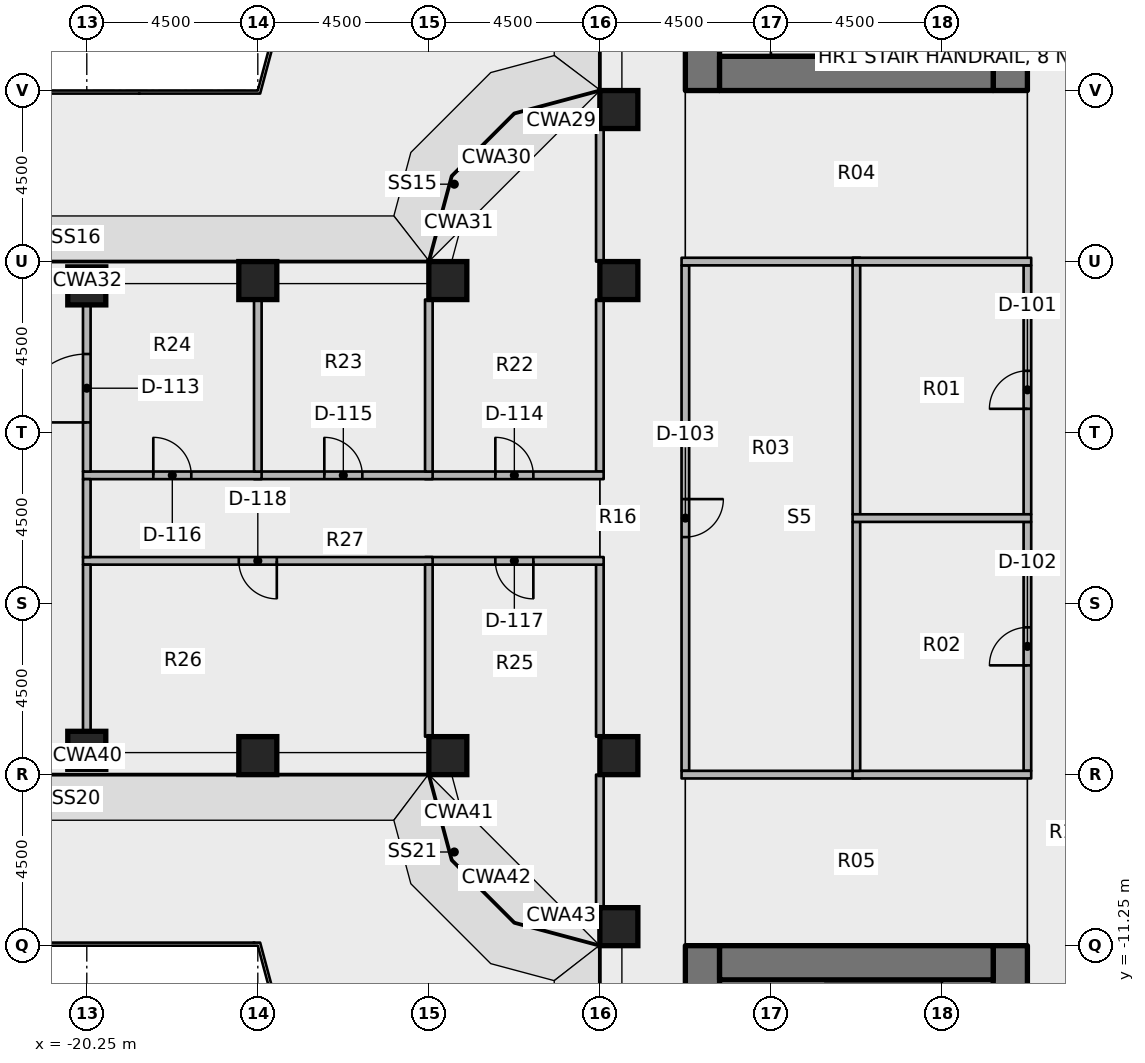
"""IFC4 building model, lengths in metres.
Left out: names, types, materials, properties, quantities, classifications, styles, units other than length and angle.
Written with IfcOpenShell. Run it as: python <this file> out.ifc"""

import sys

from ifc_helpers import new_model, si_unit, direction, frame, frame_2d, origin, origin_2d, place, context, subcontext, project, spatial, rectangle, extrude, element, fill, save


model = new_model("IFC4")
c1 = context("Model", 3, precision=1e-05, world=origin(), true_north=direction((0.0, 1.0)))
c2 = subcontext(c1, "Body", "Model", "MODEL_VIEW")
j1 = project(units=[si_unit("LENGTHUNIT", "METRE"), si_unit("PLANEANGLEUNIT", "RADIAN")], contexts=[c1])
p1 = place(None, origin())
s1 = spatial("IfcSite", under=j1, at=p1, CompositionType="ELEMENT")
p2 = place(p1, origin())
s2 = spatial("IfcBuilding", under=s1, at=p2, CompositionType="ELEMENT")
p3 = place(p2, frame((0.0, 0.0, 27.0)))
s3 = spatial("IfcBuildingStorey", under=s2, at=p3, CompositionType="ELEMENT", Elevation=27.0)
for number, where, z_axis, x_axis in (
    (1, (-20.25, -6.11, 0.0), (0.0, 0.0, 1.0), (1.0, 0.0, 0.0)),
    (2, (-20.25, 6.11, 0.0), (0.0, 0.0, 1.0), (1.0, 0.0, 0.0)),
    (3, (-15.75, -6.25, 0.0), (0.0, 0.0, 1.0), (1.0, 0.0, 0.0)),
    (4, (-15.75, 6.25, 0.0), (0.0, 0.0, 1.0), (1.0, 0.0, 0.0)),
    (5, (-10.75, -6.25, 0.0), (0.0, 0.0, 1.0), (1.0, 0.0, 0.0)),
    (6, (-10.75, 6.25, 0.0), (0.0, 0.0, 1.0), (1.0, 0.0, 0.0)),
    (7, (-6.25, -10.75, 0.0), (0.0, 0.0, 1.0), (1.0, 0.0, 0.0)),
    (8, (-6.25, -6.25, 0.0), (0.0, 0.0, 1.0), (1.0, 0.0, 0.0)),
    (9, (-6.25, 6.25, 0.0), (0.0, 0.0, 1.0), (1.0, 0.0, 0.0)),
    (10, (-6.25, 10.75, 0.0), (0.0, 0.0, 1.0), (1.0, 0.0, 0.0)),
):
    element("IfcColumn", number, at=place(p3, frame(where, z_axis=z_axis, x_axis=x_axis)), inside=s3, PredefinedType="COLUMN", context=c2, shape_type="SweptSolid", body=[
        extrude(rectangle(XDim=1.0, YDim=1.0, at=origin_2d()), origin(), (0.0, 0.0, 1.0), 4.05),
    ])
p4 = place(p3, frame((-4.05, 11.25, 0.0), z_axis=(0.0, 0.0, 1.0), x_axis=(0.0, 1.0, 0.0)))
e11 = element("IfcWall", 11, at=p4, inside=s3, PredefinedType="SHEAR", context=c2, shape_type="SweptSolid", body=[
    extrude(rectangle(XDim=15.0, YDim=0.9, at=frame_2d((7.5, 0.0))), origin(), (0.0, 0.0, 1.0), 4.2),
])
p5 = place(p4, frame((7.15, 0.0, 0.0)))
e12 = element("IfcOpeningElement", 12, at=p5, cuts=e11, PredefinedType="OPENING", context=c2, shape_type="SweptSolid", body=[
    extrude(rectangle(XDim=1.5, YDim=2.3, at=frame_2d((0.75, 1.15))), frame((0.0, 0.46, 0.0), z_axis=(0.0, -1.0, 0.0), x_axis=(1.0, 0.0, 0.0)), (0.0, 0.0, 1.0), 0.92),
])
p6 = place(p4, frame((13.9, 0.0, 0.0)))
e13 = element("IfcOpeningElement", 13, at=p6, cuts=e11, PredefinedType="OPENING", context=c2, shape_type="SweptSolid", body=[
    extrude(rectangle(XDim=0.9, YDim=2.1, at=frame_2d((0.45, 1.05))), frame((0.0, 0.46, 0.0), z_axis=(0.0, -1.0, 0.0), x_axis=(1.0, 0.0, 0.0)), (0.0, 0.0, 1.0), 0.92),
])
p7 = place(p4, frame((1.15, 0.0, 0.0)))
e14 = element("IfcOpeningElement", 14, at=p7, cuts=e11, PredefinedType="OPENING", context=c2, shape_type="SweptSolid", body=[
    extrude(rectangle(XDim=1.2, YDim=2.1, at=frame_2d((0.6, 1.05))), frame((0.0, 0.46, 0.0), z_axis=(0.0, -1.0, 0.0), x_axis=(1.0, 0.0, 0.0)), (0.0, 0.0, 1.0), 0.92),
])
p8 = place(p3, frame((4.05, 11.25, 0.0), z_axis=(0.0, 0.0, 1.0), x_axis=(0.0, 1.0, 0.0)))
e15 = element("IfcWall", 15, at=p8, inside=s3, PredefinedType="SHEAR", context=c2, shape_type="SweptSolid", body=[
    extrude(rectangle(XDim=15.0, YDim=0.9, at=frame_2d((7.5, 0.0))), origin(), (0.0, 0.0, 1.0), 4.2),
])
p9 = place(p8, frame((7.15, 0.0, 0.0)))
e16 = element("IfcOpeningElement", 16, at=p9, cuts=e15, PredefinedType="OPENING", context=c2, shape_type="SweptSolid", body=[
    extrude(rectangle(XDim=1.5, YDim=2.3, at=frame_2d((0.75, 1.15))), frame((0.0, 0.46, 0.0), z_axis=(0.0, -1.0, 0.0), x_axis=(1.0, 0.0, 0.0)), (0.0, 0.0, 1.0), 0.92),
])
p10 = place(p8, frame((5.55, 0.0, 0.0)))
e17 = element("IfcOpeningElement", 17, at=p10, cuts=e15, PredefinedType="OPENING", context=c2, shape_type="SweptSolid", body=[
    extrude(rectangle(XDim=1.2, YDim=2.1, at=frame_2d((0.6, 1.05))), frame((0.0, 0.46, 0.0), z_axis=(0.0, -1.0, 0.0), x_axis=(1.0, 0.0, 0.0)), (0.0, 0.0, 1.0), 0.92),
])
p11 = place(p3, frame((-3.6, 11.7, 0.0), z_axis=(0.0, 0.0, 1.0), x_axis=(1.0, 0.0, 0.0)))
e18 = element("IfcWall", 18, at=p11, inside=s3, PredefinedType="SHEAR", context=c2, shape_type="SweptSolid", body=[
    extrude(rectangle(XDim=7.2, YDim=0.9, at=frame_2d((3.6, 0.0))), origin(), (0.0, 0.0, 1.0), 4.2),
])
p12 = place(p3, frame((-4.05, -11.25, 0.0), z_axis=(0.0, 0.0, 1.0), x_axis=(0.0, -1.0, 0.0)))
e19 = element("IfcWall", 19, at=p12, inside=s3, PredefinedType="SHEAR", context=c2, shape_type="SweptSolid", body=[
    extrude(rectangle(XDim=15.0, YDim=0.9, at=frame_2d((7.5, 0.0))), origin(), (0.0, 0.0, 1.0), 4.2),
])
p13 = place(p12, frame((7.15, 0.0, 0.0)))
e20 = element("IfcOpeningElement", 20, at=p13, cuts=e19, PredefinedType="OPENING", context=c2, shape_type="SweptSolid", body=[
    extrude(rectangle(XDim=1.5, YDim=2.3, at=frame_2d((0.75, 1.15))), frame((0.0, 0.46, 0.0), z_axis=(0.0, -1.0, 0.0), x_axis=(1.0, 0.0, 0.0)), (0.0, 0.0, 1.0), 0.92),
])
p14 = place(p12, frame((5.55, 0.0, 0.0)))
e21 = element("IfcOpeningElement", 21, at=p14, cuts=e19, PredefinedType="OPENING", context=c2, shape_type="SweptSolid", body=[
    extrude(rectangle(XDim=1.2, YDim=2.1, at=frame_2d((0.6, 1.05))), frame((0.0, 0.46, 0.0), z_axis=(0.0, -1.0, 0.0), x_axis=(1.0, 0.0, 0.0)), (0.0, 0.0, 1.0), 0.92),
])
p15 = place(p3, frame((4.05, -11.25, 0.0), z_axis=(0.0, 0.0, 1.0), x_axis=(0.0, -1.0, 0.0)))
e22 = element("IfcWall", 22, at=p15, inside=s3, PredefinedType="SHEAR", context=c2, shape_type="SweptSolid", body=[
    extrude(rectangle(XDim=15.0, YDim=0.9, at=frame_2d((7.5, 0.0))), origin(), (0.0, 0.0, 1.0), 4.2),
])
p16 = place(p15, frame((7.15, 0.0, 0.0)))
e23 = element("IfcOpeningElement", 23, at=p16, cuts=e22, PredefinedType="OPENING", context=c2, shape_type="SweptSolid", body=[
    extrude(rectangle(XDim=1.5, YDim=2.3, at=frame_2d((0.75, 1.15))), frame((0.0, 0.46, 0.0), z_axis=(0.0, -1.0, 0.0), x_axis=(1.0, 0.0, 0.0)), (0.0, 0.0, 1.0), 0.92),
])
p17 = place(p15, frame((13.9, 0.0, 0.0)))
e24 = element("IfcOpeningElement", 24, at=p17, cuts=e22, PredefinedType="OPENING", context=c2, shape_type="SweptSolid", body=[
    extrude(rectangle(XDim=0.9, YDim=2.1, at=frame_2d((0.45, 1.05))), frame((0.0, 0.46, 0.0), z_axis=(0.0, -1.0, 0.0), x_axis=(1.0, 0.0, 0.0)), (0.0, 0.0, 1.0), 0.92),
])
p18 = place(p15, frame((1.15, 0.0, 0.0)))
e25 = element("IfcOpeningElement", 25, at=p18, cuts=e22, PredefinedType="OPENING", context=c2, shape_type="SweptSolid", body=[
    extrude(rectangle(XDim=1.2, YDim=2.1, at=frame_2d((0.6, 1.05))), frame((0.0, 0.46, 0.0), z_axis=(0.0, -1.0, 0.0), x_axis=(1.0, 0.0, 0.0)), (0.0, 0.0, 1.0), 0.92),
])
p19 = place(p3, frame((-3.6, -11.7, 0.0), z_axis=(0.0, 0.0, 1.0), x_axis=(1.0, 0.0, 0.0)))
e26 = element("IfcWall", 26, at=p19, inside=s3, PredefinedType="SHEAR", context=c2, shape_type="SweptSolid", body=[
    extrude(rectangle(XDim=7.2, YDim=0.9, at=frame_2d((3.6, 0.0))), origin(), (0.0, 0.0, 1.0), 4.2),
])
p20 = place(p3, frame((-4.5, 6.65, 0.0), z_axis=(0.0, 0.0, 1.0), x_axis=(0.0, -1.0, 0.0)))
e27 = element("IfcWall", 27, at=p20, inside=s3, PredefinedType="PARTITIONING", context=c2, shape_type="SweptSolid", body=[
    extrude(rectangle(XDim=13.3, YDim=0.2, at=frame_2d((6.65, 0.0))), origin(), (0.0, 0.0, 1.0), 3.131),
])
p21 = place(p20, frame((6.15, 0.0, 0.0)))
e28 = element("IfcOpeningElement", 28, at=p21, cuts=e27, PredefinedType="OPENING", context=c2, shape_type="SweptSolid", body=[
    extrude(rectangle(XDim=1.0, YDim=2.1, at=frame_2d((0.5, 1.05))), frame((0.0, 0.11, 0.0), z_axis=(0.0, -1.0, 0.0), x_axis=(1.0, 0.0, 0.0)), (0.0, 0.0, 1.0), 0.22),
])
p22 = place(p3, frame((-6.75, 1.225, 0.0), z_axis=(0.0, 0.0, 1.0), x_axis=(0.0, 1.0, 0.0)))
e29 = element("IfcWall", 29, at=p22, inside=s3, PredefinedType="PARTITIONING", context=c2, shape_type="SweptSolid", body=[
    extrude(rectangle(XDim=4.525, YDim=0.2, at=frame_2d((2.262, 0.0))), origin(), (0.0, 0.0, 1.0), 3.131),
])
for number, where, z_axis, x_axis in (
    (30, (-6.75, 6.75, 0.0), (0.0, 0.0, 1.0), (0.0, 1.0, 0.0)),
    (31, (-6.75, -10.25, 0.0), (0.0, 0.0, 1.0), (0.0, 1.0, 0.0)),
):
    element("IfcWall", number, at=place(p3, frame(where, z_axis=z_axis, x_axis=x_axis)), inside=s3, PredefinedType="PARTITIONING", context=c2, shape_type="SweptSolid", body=[
        extrude(rectangle(XDim=3.5, YDim=0.2, at=frame_2d((1.75, 0.0))), origin(), (0.0, 0.0, 1.0), 3.131),
    ])
p23 = place(p3, frame((-6.75, -5.75, 0.0), z_axis=(0.0, 0.0, 1.0), x_axis=(0.0, 1.0, 0.0)))
e32 = element("IfcWall", 32, at=p23, inside=s3, PredefinedType="PARTITIONING", context=c2, shape_type="SweptSolid", body=[
    extrude(rectangle(XDim=4.525, YDim=0.2, at=frame_2d((2.262, 0.0))), origin(), (0.0, 0.0, 1.0), 3.131),
])
p24 = place(p3, frame((4.5, 0.1, 0.0), z_axis=(0.0, 0.0, 1.0), x_axis=(0.0, 1.0, 0.0)))
e33 = element("IfcWall", 33, at=p24, inside=s3, PredefinedType="PARTITIONING", context=c2, shape_type="SweptSolid", body=[
    extrude(rectangle(XDim=6.55, YDim=0.2, at=frame_2d((3.275, 0.0))), origin(), (0.0, 0.0, 1.0), 3.131),
])
p25 = place(p24, frame((2.775, 0.0, 0.0)))
e34 = element("IfcOpeningElement", 34, at=p25, cuts=e33, PredefinedType="OPENING", context=c2, shape_type="SweptSolid", body=[
    extrude(rectangle(XDim=1.0, YDim=2.1, at=frame_2d((0.5, 1.05))), frame((0.0, 0.11, 0.0), z_axis=(0.0, -1.0, 0.0), x_axis=(1.0, 0.0, 0.0)), (0.0, 0.0, 1.0), 0.22),
])
p26 = place(p3, frame((4.5, -6.65, 0.0), z_axis=(0.0, 0.0, 1.0), x_axis=(0.0, 1.0, 0.0)))
e35 = element("IfcWall", 35, at=p26, inside=s3, PredefinedType="PARTITIONING", context=c2, shape_type="SweptSolid", body=[
    extrude(rectangle(XDim=6.55, YDim=0.2, at=frame_2d((3.275, 0.0))), origin(), (0.0, 0.0, 1.0), 3.131),
])
p27 = place(p26, frame((2.775, 0.0, 0.0)))
e36 = element("IfcOpeningElement", 36, at=p27, cuts=e35, PredefinedType="OPENING", context=c2, shape_type="SweptSolid", body=[
    extrude(rectangle(XDim=1.0, YDim=2.1, at=frame_2d((0.5, 1.05))), frame((0.0, 0.11, 0.0), z_axis=(0.0, -1.0, 0.0), x_axis=(1.0, 0.0, 0.0)), (0.0, 0.0, 1.0), 0.22),
])
for number, where, z_axis, x_axis in (
    (37, (-4.6, 6.75, 0.0), (0.0, 0.0, 1.0), (1.0, 0.0, 0.0)),
    (38, (-0.1, 6.75, 0.0), (0.0, 0.0, 1.0), (1.0, 0.0, 0.0)),
    (39, (-4.6, -6.75, 0.0), (0.0, 0.0, 1.0), (1.0, 0.0, 0.0)),
    (40, (-0.1, -6.75, 0.0), (0.0, 0.0, 1.0), (1.0, 0.0, 0.0)),
):
    element("IfcWall", number, at=place(p3, frame(where, z_axis=z_axis, x_axis=x_axis)), inside=s3, PredefinedType="PARTITIONING", context=c2, shape_type="SweptSolid", body=[
        extrude(rectangle(XDim=4.7, YDim=0.2, at=frame_2d((2.35, 0.0))), origin(), (0.0, 0.0, 1.0), 3.131),
    ])
for number, where, z_axis, x_axis in (
    (41, (0.0, 0.1, 0.0), (0.0, 0.0, 1.0), (0.0, 1.0, 0.0)),
    (42, (0.0, -6.65, 0.0), (0.0, 0.0, 1.0), (0.0, 1.0, 0.0)),
):
    element("IfcWall", number, at=place(p3, frame(where, z_axis=z_axis, x_axis=x_axis)), inside=s3, PredefinedType="PARTITIONING", context=c2, shape_type="SweptSolid", body=[
        extrude(rectangle(XDim=6.55, YDim=0.2, at=frame_2d((3.275, 0.0))), origin(), (0.0, 0.0, 1.0), 3.131),
    ])
p28 = place(p3, frame((-0.1, 0.0, 0.0), z_axis=(0.0, 0.0, 1.0), x_axis=(1.0, 0.0, 0.0)))
e43 = element("IfcWall", 43, at=p28, inside=s3, PredefinedType="PARTITIONING", context=c2, shape_type="SweptSolid", body=[
    extrude(rectangle(XDim=4.7, YDim=0.2, at=frame_2d((2.35, 0.0))), origin(), (0.0, 0.0, 1.0), 3.131),
])
p29 = place(p3, frame((-11.35, 1.125, 0.0), z_axis=(0.0, 0.0, 1.0), x_axis=(1.0, 0.0, 0.0)))
e44 = element("IfcWall", 44, at=p29, inside=s3, PredefinedType="PARTITIONING", context=c2, shape_type="SweptSolid", body=[
    extrude(rectangle(XDim=4.7, YDim=0.2, at=frame_2d((2.35, 0.0))), origin(), (0.0, 0.0, 1.0), 3.131),
])
p30 = place(p29, frame((1.85, 0.0, 0.0)))
e45 = element("IfcOpeningElement", 45, at=p30, cuts=e44, PredefinedType="OPENING", context=c2, shape_type="SweptSolid", body=[
    extrude(rectangle(XDim=1.0, YDim=2.1, at=frame_2d((0.5, 1.05))), frame((0.0, 0.11, 0.0), z_axis=(0.0, -1.0, 0.0), x_axis=(1.0, 0.0, 0.0)), (0.0, 0.0, 1.0), 0.22),
])
p31 = place(p3, frame((-6.65, -1.125, 0.0), z_axis=(0.0, 0.0, 1.0), x_axis=(-1.0, 0.0, 0.0)))
e46 = element("IfcWall", 46, at=p31, inside=s3, PredefinedType="PARTITIONING", context=c2, shape_type="SweptSolid", body=[
    extrude(rectangle(XDim=4.7, YDim=0.2, at=frame_2d((2.35, 0.0))), origin(), (0.0, 0.0, 1.0), 3.131),
])
p32 = place(p31, frame((1.85, 0.0, 0.0)))
e47 = element("IfcOpeningElement", 47, at=p32, cuts=e46, PredefinedType="OPENING", context=c2, shape_type="SweptSolid", body=[
    extrude(rectangle(XDim=1.0, YDim=2.1, at=frame_2d((0.5, 1.05))), frame((0.0, 0.11, 0.0), z_axis=(0.0, -1.0, 0.0), x_axis=(1.0, 0.0, 0.0)), (0.0, 0.0, 1.0), 0.22),
])
p33 = place(p3, frame((-15.85, 1.125, 0.0), z_axis=(0.0, 0.0, 1.0), x_axis=(1.0, 0.0, 0.0)))
e48 = element("IfcWall", 48, at=p33, inside=s3, PredefinedType="PARTITIONING", context=c2, shape_type="SweptSolid", body=[
    extrude(rectangle(XDim=4.7, YDim=0.2, at=frame_2d((2.35, 0.0))), origin(), (0.0, 0.0, 1.0), 3.131),
])
p34 = place(p33, frame((1.85, 0.0, 0.0)))
e49 = element("IfcOpeningElement", 49, at=p34, cuts=e48, PredefinedType="OPENING", context=c2, shape_type="SweptSolid", body=[
    extrude(rectangle(XDim=1.0, YDim=2.1, at=frame_2d((0.5, 1.05))), frame((0.0, 0.11, 0.0), z_axis=(0.0, -1.0, 0.0), x_axis=(1.0, 0.0, 0.0)), (0.0, 0.0, 1.0), 0.22),
])
p35 = place(p3, frame((-20.35, 1.125, 0.0), z_axis=(0.0, 0.0, 1.0), x_axis=(1.0, 0.0, 0.0)))
e50 = element("IfcWall", 50, at=p35, inside=s3, PredefinedType="PARTITIONING", context=c2, shape_type="SweptSolid", body=[
    extrude(rectangle(XDim=4.7, YDim=0.2, at=frame_2d((2.35, 0.0))), origin(), (0.0, 0.0, 1.0), 3.131),
])
p36 = place(p35, frame((1.85, 0.0, 0.0)))
e51 = element("IfcOpeningElement", 51, at=p36, cuts=e50, PredefinedType="OPENING", context=c2, shape_type="SweptSolid", body=[
    extrude(rectangle(XDim=1.0, YDim=2.1, at=frame_2d((0.5, 1.05))), frame((0.0, 0.11, 0.0), z_axis=(0.0, -1.0, 0.0), x_axis=(1.0, 0.0, 0.0)), (0.0, 0.0, 1.0), 0.22),
])
p37 = place(p3, frame((-11.15, -1.125, 0.0), z_axis=(0.0, 0.0, 1.0), x_axis=(-1.0, 0.0, 0.0)))
e52 = element("IfcWall", 52, at=p37, inside=s3, PredefinedType="PARTITIONING", context=c2, shape_type="SweptSolid", body=[
    extrude(rectangle(XDim=9.2, YDim=0.2, at=frame_2d((4.6, 0.0))), origin(), (0.0, 0.0, 1.0), 3.131),
])
p38 = place(p37, frame((4.1, 0.0, 0.0)))
e53 = element("IfcOpeningElement", 53, at=p38, cuts=e52, PredefinedType="OPENING", context=c2, shape_type="SweptSolid", body=[
    extrude(rectangle(XDim=1.0, YDim=2.1, at=frame_2d((0.5, 1.05))), frame((0.0, 0.11, 0.0), z_axis=(0.0, -1.0, 0.0), x_axis=(1.0, 0.0, 0.0)), (0.0, 0.0, 1.0), 0.22),
])
p39 = place(p3, frame((-20.25, -1.025, 0.0), z_axis=(0.0, 0.0, 1.0), x_axis=(0.0, 1.0, 0.0)))
e54 = element("IfcWall", 54, at=p39, inside=s3, PredefinedType="PARTITIONING", context=c2, shape_type="SweptSolid", body=[
    extrude(rectangle(XDim=2.05, YDim=0.2, at=frame_2d((1.025, 0.0))), origin(), (0.0, 0.0, 1.0), 3.131),
])
for number, where, z_axis, x_axis in (
    (55, (-11.25, 1.225, 0.0), (0.0, 0.0, 1.0), (0.0, 1.0, 0.0)),
    (56, (-11.25, -5.75, 0.0), (0.0, 0.0, 1.0), (0.0, 1.0, 0.0)),
    (57, (-15.75, 1.225, 0.0), (0.0, 0.0, 1.0), (0.0, 1.0, 0.0)),
):
    element("IfcWall", number, at=place(p3, frame(where, z_axis=z_axis, x_axis=x_axis)), inside=s3, PredefinedType="PARTITIONING", context=c2, shape_type="SweptSolid", body=[
        extrude(rectangle(XDim=4.525, YDim=0.2, at=frame_2d((2.262, 0.0))), origin(), (0.0, 0.0, 1.0), 3.131),
    ])
p40 = place(p3, frame((-20.25, 1.225, 0.0), z_axis=(0.0, 0.0, 1.0), x_axis=(0.0, 1.0, 0.0)))
e58 = element("IfcWall", 58, at=p40, inside=s3, PredefinedType="PARTITIONING", context=c2, shape_type="SweptSolid", body=[
    extrude(rectangle(XDim=4.385, YDim=0.2, at=frame_2d((2.192, 0.0))), origin(), (0.0, 0.0, 1.0), 3.131),
])
p41 = place(p40, frame((1.292, 0.0, 0.0)))
e59 = element("IfcOpeningElement", 59, at=p41, cuts=e58, PredefinedType="OPENING", context=c2, shape_type="SweptSolid", body=[
    extrude(rectangle(XDim=1.8, YDim=2.1, at=frame_2d((0.9, 1.05))), frame((0.0, 0.11, 0.0), z_axis=(0.0, -1.0, 0.0), x_axis=(1.0, 0.0, 0.0)), (0.0, 0.0, 1.0), 0.22),
])
p42 = place(p3, frame((-20.25, -5.61, 0.0), z_axis=(0.0, 0.0, 1.0), x_axis=(0.0, 1.0, 0.0)))
e60 = element("IfcWall", 60, at=p42, inside=s3, PredefinedType="PARTITIONING", context=c2, shape_type="SweptSolid", body=[
    extrude(rectangle(XDim=4.385, YDim=0.2, at=frame_2d((2.192, 0.0))), origin(), (0.0, 0.0, 1.0), 3.131),
])
p43 = place(p25, origin())
e61 = element("IfcDoor", 61, at=p43, inside=s3, OperationType="SINGLE_SWING_LEFT", PredefinedType="DOOR", context=c2, shape_type="SweptSolid", body=[
    extrude(rectangle(XDim=1.0, YDim=2.1, at=frame_2d((0.5, 1.05))), frame((0.0, 0.025, 0.0), z_axis=(0.0, -1.0, 0.0), x_axis=(1.0, 0.0, 0.0)), (0.0, 0.0, 1.0), 0.05),
])
fill(e34, e61)
p44 = place(p27, origin())
e62 = element("IfcDoor", 62, at=p44, inside=s3, OperationType="SINGLE_SWING_RIGHT", PredefinedType="DOOR", context=c2, shape_type="SweptSolid", body=[
    extrude(rectangle(XDim=1.0, YDim=2.1, at=frame_2d((0.5, 1.05))), frame((0.0, 0.025, 0.0), z_axis=(0.0, -1.0, 0.0), x_axis=(1.0, 0.0, 0.0)), (0.0, 0.0, 1.0), 0.05),
])
fill(e36, e62)
p45 = place(p21, origin())
e63 = element("IfcDoor", 63, at=p45, inside=s3, OperationType="SINGLE_SWING_RIGHT", PredefinedType="DOOR", context=c2, shape_type="SweptSolid", body=[
    extrude(rectangle(XDim=1.0, YDim=2.1, at=frame_2d((0.5, 1.05))), frame((0.0, 0.025, 0.0), z_axis=(0.0, -1.0, 0.0), x_axis=(1.0, 0.0, 0.0)), (0.0, 0.0, 1.0), 0.05),
])
fill(e28, e63)
p46 = place(p41, origin())
e64 = element("IfcDoor", 64, at=p46, inside=s3, OperationType="DOUBLE_DOOR_SINGLE_SWING", PredefinedType="DOOR", context=c2, shape_type="SweptSolid", body=[
    extrude(rectangle(XDim=1.8, YDim=2.1, at=frame_2d((0.9, 1.05))), frame((0.0, 0.025, 0.0), z_axis=(0.0, -1.0, 0.0), x_axis=(1.0, 0.0, 0.0)), (0.0, 0.0, 1.0), 0.05),
])
fill(e59, e64)
p47 = place(p30, origin())
e65 = element("IfcDoor", 65, at=p47, inside=s3, OperationType="SINGLE_SWING_RIGHT", PredefinedType="DOOR", context=c2, shape_type="SweptSolid", body=[
    extrude(rectangle(XDim=1.0, YDim=2.1, at=frame_2d((0.5, 1.05))), frame((0.0, 0.025, 0.0), z_axis=(0.0, -1.0, 0.0), x_axis=(1.0, 0.0, 0.0)), (0.0, 0.0, 1.0), 0.05),
])
fill(e45, e65)
p48 = place(p34, origin())
e66 = element("IfcDoor", 66, at=p48, inside=s3, OperationType="SINGLE_SWING_RIGHT", PredefinedType="DOOR", context=c2, shape_type="SweptSolid", body=[
    extrude(rectangle(XDim=1.0, YDim=2.1, at=frame_2d((0.5, 1.05))), frame((0.0, 0.025, 0.0), z_axis=(0.0, -1.0, 0.0), x_axis=(1.0, 0.0, 0.0)), (0.0, 0.0, 1.0), 0.05),
])
fill(e49, e66)
p49 = place(p36, origin())
e67 = element("IfcDoor", 67, at=p49, inside=s3, OperationType="SINGLE_SWING_RIGHT", PredefinedType="DOOR", context=c2, shape_type="SweptSolid", body=[
    extrude(rectangle(XDim=1.0, YDim=2.1, at=frame_2d((0.5, 1.05))), frame((0.0, 0.025, 0.0), z_axis=(0.0, -1.0, 0.0), x_axis=(1.0, 0.0, 0.0)), (0.0, 0.0, 1.0), 0.05),
])
fill(e51, e67)
p50 = place(p32, origin())
e68 = element("IfcDoor", 68, at=p50, inside=s3, OperationType="SINGLE_SWING_RIGHT", PredefinedType="DOOR", context=c2, shape_type="SweptSolid", body=[
    extrude(rectangle(XDim=1.0, YDim=2.1, at=frame_2d((0.5, 1.05))), frame((0.0, 0.025, 0.0), z_axis=(0.0, -1.0, 0.0), x_axis=(1.0, 0.0, 0.0)), (0.0, 0.0, 1.0), 0.05),
])
fill(e47, e68)
p51 = place(p38, origin())
e69 = element("IfcDoor", 69, at=p51, inside=s3, OperationType="SINGLE_SWING_LEFT", PredefinedType="DOOR", context=c2, shape_type="SweptSolid", body=[
    extrude(rectangle(XDim=1.0, YDim=2.1, at=frame_2d((0.5, 1.05))), frame((0.0, 0.025, 0.0), z_axis=(0.0, -1.0, 0.0), x_axis=(1.0, 0.0, 0.0)), (0.0, 0.0, 1.0), 0.05),
])
fill(e53, e69)
save(model, sys.argv[1])
